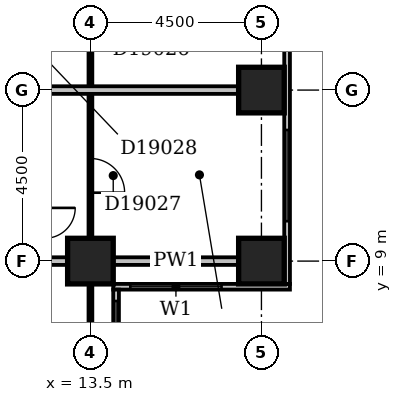
"""IFC4 building model, lengths in metres.
Left out: names, types, materials, properties, quantities, classifications, styles, units other than length and angle.
Written with IfcOpenShell. Run it as: python <this file> out.ifc"""

import sys

from ifc_helpers import new_model, si_unit, direction, frame, frame_2d, origin, origin_2d, place, context, subcontext, project, spatial, rectangle, extrude, element, fill, save


model = new_model("IFC4")
c1 = context("Model", 3, precision=1e-05, world=origin(), true_north=direction((0.0, 1.0)))
c2 = subcontext(c1, "Body", "Model", "MODEL_VIEW")
j1 = project(units=[si_unit("LENGTHUNIT", "METRE"), si_unit("PLANEANGLEUNIT", "RADIAN")], contexts=[c1])
p1 = place(None, origin())
s1 = spatial("IfcSite", under=j1, at=p1, CompositionType="ELEMENT")
p2 = place(p1, origin())
s2 = spatial("IfcBuilding", under=s1, at=p2, CompositionType="ELEMENT")
p3 = place(p2, frame((0.0, 0.0, 79.4)))
s3 = spatial("IfcBuildingStorey", under=s2, at=p3, CompositionType="ELEMENT", Elevation=79.4)
for number, where, z_axis, x_axis in (
    (1, (13.5, 9.0, -0.3), (0.0, 0.0, 1.0), (1.0, 0.0, 0.0)),
    (2, (18.0, 9.0, -0.3), (0.0, 0.0, 1.0), (1.0, 0.0, 0.0)),
    (3, (18.0, 13.5, -0.3), (0.0, 0.0, 1.0), (1.0, 0.0, 0.0)),
):
    element("IfcColumn", number, at=place(p3, frame(where, z_axis=z_axis, x_axis=x_axis)), inside=s3, PredefinedType="COLUMN", context=c2, shape_type="SweptSolid", body=[
        extrude(rectangle(XDim=1.2, YDim=1.2, at=origin_2d()), origin(), (0.0, 0.0, 1.0), 3.6),
    ])
p4 = place(p3, frame((14.175, 3.9, 0.0), z_axis=(0.0, 0.0, 1.0), x_axis=(0.0, 1.0, 0.0)))
e4 = element("IfcWall", 4, at=p4, inside=s3, PredefinedType="STANDARD", context=c2, shape_type="SweptSolid", body=[
    extrude(rectangle(XDim=4.35, YDim=0.15, at=frame_2d((2.175, 0.0))), origin(), (0.0, 0.0, 1.0), 2.7),
])
p5 = place(p4, frame((1.65, 0.0, 0.6)))
e5 = element("IfcOpeningElement", 5, at=p5, cuts=e4, PredefinedType="OPENING", context=c2, shape_type="SweptSolid", body=[
    extrude(rectangle(XDim=2.4, YDim=1.8, at=frame_2d((1.2, 0.9))), frame((0.0, 0.087, 0.0), z_axis=(0.0, -1.0, 0.0), x_axis=(1.0, 0.0, 0.0)), (0.0, 0.0, 1.0), 0.174),
])
p6 = place(p3, frame((14.1, 8.325, 0.0), z_axis=(0.0, 0.0, 1.0), x_axis=(1.0, 0.0, 0.0)))
e6 = element("IfcWall", 6, at=p6, inside=s3, PredefinedType="STANDARD", context=c2, shape_type="SweptSolid", body=[
    extrude(rectangle(XDim=4.65, YDim=0.15, at=frame_2d((2.325, 0.0))), origin(), (0.0, 0.0, 1.0), 2.7),
])
p7 = place(p6, frame((0.45, 0.0, 0.6)))
e7 = element("IfcOpeningElement", 7, at=p7, cuts=e6, PredefinedType="OPENING", context=c2, shape_type="SweptSolid", body=[
    extrude(rectangle(XDim=2.4, YDim=1.8, at=frame_2d((1.2, 0.9))), frame((0.0, 0.087, 0.0), z_axis=(0.0, -1.0, 0.0), x_axis=(1.0, 0.0, 0.0)), (0.0, 0.0, 1.0), 0.174),
])
p8 = place(p3, frame((18.675, 8.4, 0.0), z_axis=(0.0, 0.0, 1.0), x_axis=(0.0, 1.0, 0.0)))
e8 = element("IfcWall", 8, at=p8, inside=s3, PredefinedType="STANDARD", context=c2, shape_type="SweptSolid", body=[
    extrude(rectangle(XDim=8.85, YDim=0.15, at=frame_2d((4.425, 0.0))), origin(), (0.0, 0.0, 1.0), 2.7),
])
p9 = place(p8, frame((1.65, 0.0, 0.6)))
e9 = element("IfcOpeningElement", 9, at=p9, cuts=e8, PredefinedType="OPENING", context=c2, shape_type="SweptSolid", body=[
    extrude(rectangle(XDim=2.4, YDim=1.8, at=frame_2d((1.2, 0.9))), frame((0.0, 0.087, 0.0), z_axis=(0.0, -1.0, 0.0), x_axis=(1.0, 0.0, 0.0)), (0.0, 0.0, 1.0), 0.174),
])
p10 = place(p8, frame((6.15, 0.0, 0.6)))
e10 = element("IfcOpeningElement", 10, at=p10, cuts=e8, PredefinedType="OPENING", context=c2, shape_type="SweptSolid", body=[
    extrude(rectangle(XDim=2.4, YDim=1.8, at=frame_2d((1.2, 0.9))), frame((0.0, 0.087, 0.0), z_axis=(0.0, -1.0, 0.0), x_axis=(1.0, 0.0, 0.0)), (0.0, 0.0, 1.0), 0.174),
])
p11 = place(p3, frame((13.5, 5.1, 0.0), z_axis=(0.0, 0.0, 1.0), x_axis=(0.0, 1.0, 0.0)))
e11 = element("IfcWall", 11, at=p11, inside=s3, PredefinedType="PARTITIONING", context=c2, shape_type="SweptSolid", body=[
    extrude(rectangle(XDim=3.3, YDim=0.1, at=frame_2d((1.65, 0.0))), origin(), (0.0, 0.0, 1.0), 2.7),
])
p12 = place(p3, frame((9.1, 9.0, 0.0), z_axis=(0.0, 0.0, 1.0), x_axis=(1.0, 0.0, 0.0)))
e12 = element("IfcWall", 12, at=p12, inside=s3, PredefinedType="PARTITIONING", context=c2, shape_type="SweptSolid", body=[
    extrude(rectangle(XDim=3.8, YDim=0.2, at=frame_2d((1.9, 0.0))), origin(), (0.0, 0.0, 1.0), 3.3),
])
p13 = place(p3, frame((14.1, 9.0, 0.0), z_axis=(0.0, 0.0, 1.0), x_axis=(1.0, 0.0, 0.0)))
e13 = element("IfcWall", 13, at=p13, inside=s3, PredefinedType="PARTITIONING", context=c2, shape_type="SweptSolid", body=[
    extrude(rectangle(XDim=3.3, YDim=0.2, at=frame_2d((1.65, 0.0))), origin(), (0.0, 0.0, 1.0), 2.7),
])
p14 = place(p3, frame((13.5, 9.6, 0.0), z_axis=(0.0, 0.0, 1.0), x_axis=(0.0, 1.0, 0.0)))
e14 = element("IfcWall", 14, at=p14, inside=s3, PredefinedType="PARTITIONING", context=c2, shape_type="SweptSolid", body=[
    extrude(rectangle(XDim=8.3, YDim=0.1, at=frame_2d((4.15, 0.0))), origin(), (0.0, 0.0, 1.0), 3.3),
])
p15 = place(p14, frame((5.7, 0.0, 0.0)))
e15 = element("IfcOpeningElement", 15, at=p15, cuts=e14, PredefinedType="OPENING", context=c2, shape_type="SweptSolid", body=[
    extrude(rectangle(XDim=0.9, YDim=2.1, at=frame_2d((0.45, 1.05))), frame((0.0, 0.062, 0.0), z_axis=(0.0, -1.0, 0.0), x_axis=(1.0, 0.0, 0.0)), (0.0, 0.0, 1.0), 0.124),
])
p16 = place(p14, frame((1.2, 0.0, 0.0)))
e16 = element("IfcOpeningElement", 16, at=p16, cuts=e14, PredefinedType="OPENING", context=c2, shape_type="SweptSolid", body=[
    extrude(rectangle(XDim=0.9, YDim=2.1, at=frame_2d((0.45, 1.05))), frame((0.0, 0.062, 0.0), z_axis=(0.0, -1.0, 0.0), x_axis=(1.0, 0.0, 0.0)), (0.0, 0.0, 1.0), 0.124),
])
p17 = place(p3, frame((9.1, 13.5, 0.0), z_axis=(0.0, 0.0, 1.0), x_axis=(1.0, 0.0, 0.0)))
e17 = element("IfcWall", 17, at=p17, inside=s3, PredefinedType="PARTITIONING", context=c2, shape_type="SweptSolid", body=[
    extrude(rectangle(XDim=8.3, YDim=0.2, at=frame_2d((4.15, 0.0))), origin(), (0.0, 0.0, 1.0), 3.3),
])
p18 = place(p5, origin())
e18 = element("IfcWindow", 18, at=p18, inside=s3, PartitioningType="SINGLE_PANEL", PredefinedType="WINDOW", context=c2, shape_type="SweptSolid", body=[
    extrude(rectangle(XDim=2.4, YDim=1.8, at=frame_2d((1.2, 0.9))), frame((0.0, 0.03, 0.0), z_axis=(0.0, -1.0, 0.0), x_axis=(1.0, 0.0, 0.0)), (0.0, 0.0, 1.0), 0.06),
])
fill(e5, e18)
p19 = place(p7, origin())
e19 = element("IfcWindow", 19, at=p19, inside=s3, PartitioningType="SINGLE_PANEL", PredefinedType="WINDOW", context=c2, shape_type="SweptSolid", body=[
    extrude(rectangle(XDim=2.4, YDim=1.8, at=frame_2d((1.2, 0.9))), frame((0.0, 0.03, 0.0), z_axis=(0.0, -1.0, 0.0), x_axis=(1.0, 0.0, 0.0)), (0.0, 0.0, 1.0), 0.06),
])
fill(e7, e19)
p20 = place(p9, origin())
e20 = element("IfcWindow", 20, at=p20, inside=s3, PartitioningType="SINGLE_PANEL", PredefinedType="WINDOW", context=c2, shape_type="SweptSolid", body=[
    extrude(rectangle(XDim=2.4, YDim=1.8, at=frame_2d((1.2, 0.9))), frame((0.0, 0.03, 0.0), z_axis=(0.0, -1.0, 0.0), x_axis=(1.0, 0.0, 0.0)), (0.0, 0.0, 1.0), 0.06),
])
fill(e9, e20)
p21 = place(p16, frame((0.9, 0.0, 0.0), z_axis=(0.0, 0.0, 1.0), x_axis=(-1.0, 0.0, 0.0)))
e21 = element("IfcDoor", 21, at=p21, inside=s3, OperationType="SINGLE_SWING_RIGHT", PredefinedType="DOOR", context=c2, shape_type="SweptSolid", body=[
    extrude(rectangle(XDim=0.9, YDim=2.1, at=frame_2d((0.45, 1.05))), frame((0.0, 0.025, 0.0), z_axis=(0.0, -1.0, 0.0), x_axis=(1.0, 0.0, 0.0)), (0.0, 0.0, 1.0), 0.05),
])
fill(e16, e21)
save(model, sys.argv[1])
